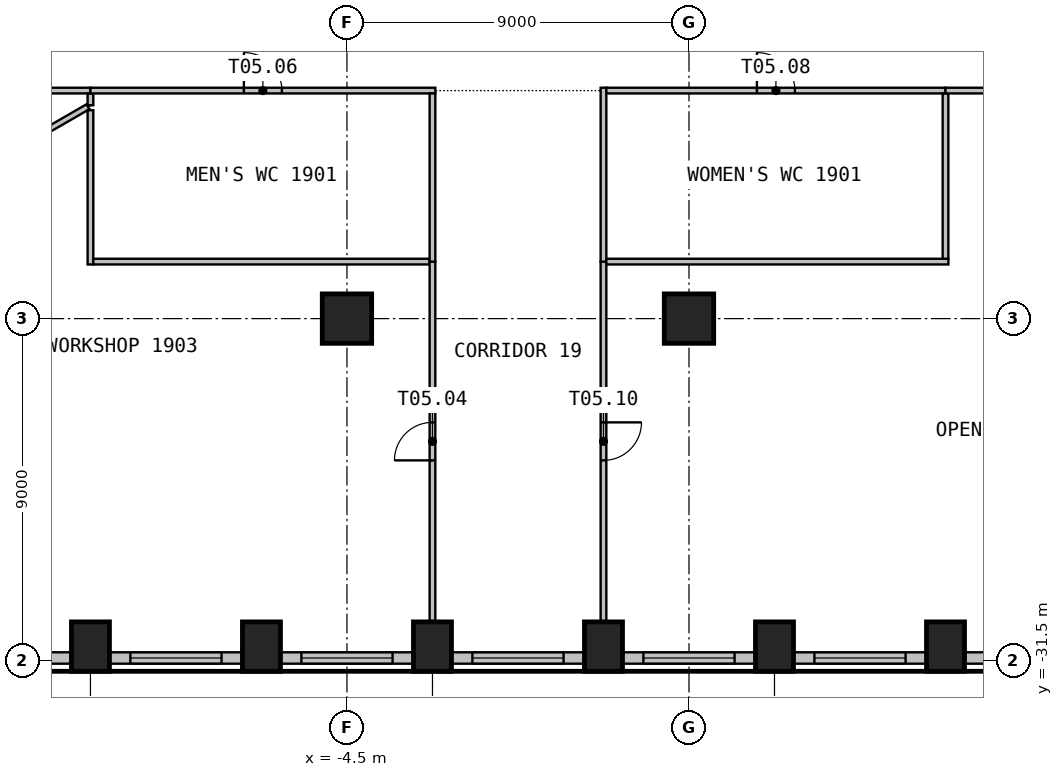
"""IFC4 building model, lengths in metres.
Left out: names, types, materials, properties, quantities, classifications, styles, units other than length and angle.
Written with IfcOpenShell. Run it as: python <this file> out.ifc"""

import sys

from ifc_helpers import new_model, si_unit, direction, frame, frame_2d, origin, origin_2d, place, context, subcontext, project, spatial, rectangle, circle, extrude, element, fill, save


model = new_model("IFC4")
c1 = context("Model", 3, precision=1e-05, world=origin(), true_north=direction((0.0, 1.0)))
c2 = subcontext(c1, "Body", "Model", "MODEL_VIEW")
j1 = project(units=[si_unit("LENGTHUNIT", "METRE"), si_unit("PLANEANGLEUNIT", "RADIAN")], contexts=[c1])
p1 = place(None, origin())
s1 = spatial("IfcSite", under=j1, at=p1, CompositionType="ELEMENT")
p2 = place(p1, origin())
s2 = spatial("IfcBuilding", under=s1, at=p2, CompositionType="ELEMENT")
p3 = place(p2, frame((0.0, 0.0, 81.3)))
s3 = spatial("IfcBuildingStorey", under=s2, at=p3, CompositionType="ELEMENT", Elevation=81.3)
for number, where, z_axis, x_axis in (
    (1, (-11.25, -31.13, 0.0), (0.0, 0.0, 1.0), (1.0, 0.0, 0.0)),
    (2, (-6.75, -31.13, 0.0), (0.0, 0.0, 1.0), (1.0, 0.0, 0.0)),
    (3, (-2.25, -31.13, 0.0), (0.0, 0.0, 1.0), (1.0, 0.0, 0.0)),
    (4, (2.25, -31.13, 0.0), (0.0, 0.0, 1.0), (1.0, 0.0, 0.0)),
    (5, (6.75, -31.13, 0.0), (0.0, 0.0, 1.0), (1.0, 0.0, 0.0)),
    (6, (11.25, -31.13, 0.0), (0.0, 0.0, 1.0), (1.0, 0.0, 0.0)),
):
    element("IfcColumn", number, at=place(p3, frame(where, z_axis=z_axis, x_axis=x_axis)), inside=s3, PredefinedType="COLUMN", context=c2, shape_type="SweptSolid", body=[
        extrude(rectangle(XDim=1.0, YDim=1.3, at=origin_2d()), origin(), (0.0, 0.0, 1.0), 3.525),
    ])
for number, where, z_axis, x_axis in (
    (7, (-4.5, -22.5, 0.0), (0.0, 0.0, 1.0), (1.0, 0.0, 0.0)),
    (8, (4.5, -22.5, 0.0), (0.0, 0.0, 1.0), (1.0, 0.0, 0.0)),
):
    element("IfcColumn", number, at=place(p3, frame(where, z_axis=z_axis, x_axis=x_axis)), inside=s3, PredefinedType="COLUMN", context=c2, shape_type="SweptSolid", body=[
        extrude(circle(Radius=0.65, at=origin_2d()), origin(), (0.0, 0.0, 1.0), 3.525),
    ])
p4 = place(p3, frame((-15.25, -31.43, 0.0), z_axis=(0.0, 0.0, 1.0), x_axis=(1.0, 0.0, 0.0)))
e9 = element("IfcWall", 9, at=p4, inside=s3, PredefinedType="SOLIDWALL", context=c2, shape_type="SweptSolid", body=[
    extrude(rectangle(XDim=3.499, YDim=0.3, at=frame_2d((1.75, 0.0))), origin(), (0.0, 0.0, 1.0), 3.525),
])
p5 = place(p4, frame((0.55, 0.0, 0.9)))
e10 = element("IfcOpeningElement", 10, at=p5, cuts=e9, PredefinedType="OPENING", context=c2, shape_type="SweptSolid", body=[
    extrude(rectangle(XDim=2.4, YDim=2.1, at=frame_2d((1.2, 1.05))), frame((0.0, 0.16, 0.0), z_axis=(0.0, -1.0, 0.0), x_axis=(1.0, 0.0, 0.0)), (0.0, 0.0, 1.0), 0.32),
])
p6 = place(p3, frame((-10.75, -31.43, 0.0), z_axis=(0.0, 0.0, 1.0), x_axis=(1.0, 0.0, 0.0)))
e11 = element("IfcWall", 11, at=p6, inside=s3, PredefinedType="SOLIDWALL", context=c2, shape_type="SweptSolid", body=[
    extrude(rectangle(XDim=3.499, YDim=0.3, at=frame_2d((1.75, 0.0))), origin(), (0.0, 0.0, 1.0), 3.525),
])
p7 = place(p6, frame((0.55, 0.0, 0.9)))
e12 = element("IfcOpeningElement", 12, at=p7, cuts=e11, PredefinedType="OPENING", context=c2, shape_type="SweptSolid", body=[
    extrude(rectangle(XDim=2.4, YDim=2.1, at=frame_2d((1.2, 1.05))), frame((0.0, 0.16, 0.0), z_axis=(0.0, -1.0, 0.0), x_axis=(1.0, 0.0, 0.0)), (0.0, 0.0, 1.0), 0.32),
])
p8 = place(p3, frame((-6.25, -31.43, 0.0), z_axis=(0.0, 0.0, 1.0), x_axis=(1.0, 0.0, 0.0)))
e13 = element("IfcWall", 13, at=p8, inside=s3, PredefinedType="SOLIDWALL", context=c2, shape_type="SweptSolid", body=[
    extrude(rectangle(XDim=3.499, YDim=0.3, at=frame_2d((1.75, 0.0))), origin(), (0.0, 0.0, 1.0), 3.525),
])
p9 = place(p8, frame((0.55, 0.0, 0.9)))
e14 = element("IfcOpeningElement", 14, at=p9, cuts=e13, PredefinedType="OPENING", context=c2, shape_type="SweptSolid", body=[
    extrude(rectangle(XDim=2.4, YDim=2.1, at=frame_2d((1.2, 1.05))), frame((0.0, 0.16, 0.0), z_axis=(0.0, -1.0, 0.0), x_axis=(1.0, 0.0, 0.0)), (0.0, 0.0, 1.0), 0.32),
])
p10 = place(p3, frame((-1.75, -31.43, 0.0), z_axis=(0.0, 0.0, 1.0), x_axis=(1.0, 0.0, 0.0)))
e15 = element("IfcWall", 15, at=p10, inside=s3, PredefinedType="SOLIDWALL", context=c2, shape_type="SweptSolid", body=[
    extrude(rectangle(XDim=3.499, YDim=0.3, at=frame_2d((1.75, 0.0))), origin(), (0.0, 0.0, 1.0), 3.525),
])
p11 = place(p10, frame((0.55, 0.0, 0.9)))
e16 = element("IfcOpeningElement", 16, at=p11, cuts=e15, PredefinedType="OPENING", context=c2, shape_type="SweptSolid", body=[
    extrude(rectangle(XDim=2.4, YDim=2.1, at=frame_2d((1.2, 1.05))), frame((0.0, 0.16, 0.0), z_axis=(0.0, -1.0, 0.0), x_axis=(1.0, 0.0, 0.0)), (0.0, 0.0, 1.0), 0.32),
])
p12 = place(p3, frame((2.75, -31.43, 0.0), z_axis=(0.0, 0.0, 1.0), x_axis=(1.0, 0.0, 0.0)))
e17 = element("IfcWall", 17, at=p12, inside=s3, PredefinedType="SOLIDWALL", context=c2, shape_type="SweptSolid", body=[
    extrude(rectangle(XDim=3.499, YDim=0.3, at=frame_2d((1.75, 0.0))), origin(), (0.0, 0.0, 1.0), 3.525),
])
p13 = place(p12, frame((0.55, 0.0, 0.9)))
e18 = element("IfcOpeningElement", 18, at=p13, cuts=e17, PredefinedType="OPENING", context=c2, shape_type="SweptSolid", body=[
    extrude(rectangle(XDim=2.4, YDim=2.1, at=frame_2d((1.2, 1.05))), frame((0.0, 0.16, 0.0), z_axis=(0.0, -1.0, 0.0), x_axis=(1.0, 0.0, 0.0)), (0.0, 0.0, 1.0), 0.32),
])
p14 = place(p3, frame((7.25, -31.43, 0.0), z_axis=(0.0, 0.0, 1.0), x_axis=(1.0, 0.0, 0.0)))
e19 = element("IfcWall", 19, at=p14, inside=s3, PredefinedType="SOLIDWALL", context=c2, shape_type="SweptSolid", body=[
    extrude(rectangle(XDim=3.499, YDim=0.3, at=frame_2d((1.75, 0.0))), origin(), (0.0, 0.0, 1.0), 3.525),
])
p15 = place(p14, frame((0.55, 0.0, 0.9)))
e20 = element("IfcOpeningElement", 20, at=p15, cuts=e19, PredefinedType="OPENING", context=c2, shape_type="SweptSolid", body=[
    extrude(rectangle(XDim=2.4, YDim=2.1, at=frame_2d((1.2, 1.05))), frame((0.0, 0.16, 0.0), z_axis=(0.0, -1.0, 0.0), x_axis=(1.0, 0.0, 0.0)), (0.0, 0.0, 1.0), 0.32),
])
p16 = place(p3, frame((11.75, -31.43, 0.0), z_axis=(0.0, 0.0, 1.0), x_axis=(1.0, 0.0, 0.0)))
e21 = element("IfcWall", 21, at=p16, inside=s3, PredefinedType="SOLIDWALL", context=c2, shape_type="SweptSolid", body=[
    extrude(rectangle(XDim=3.499, YDim=0.3, at=frame_2d((1.75, 0.0))), origin(), (0.0, 0.0, 1.0), 3.525),
])
p17 = place(p16, frame((0.55, 0.0, 0.9)))
e22 = element("IfcOpeningElement", 22, at=p17, cuts=e21, PredefinedType="OPENING", context=c2, shape_type="SweptSolid", body=[
    extrude(rectangle(XDim=2.4, YDim=2.1, at=frame_2d((1.2, 1.05))), frame((0.0, 0.16, 0.0), z_axis=(0.0, -1.0, 0.0), x_axis=(1.0, 0.0, 0.0)), (0.0, 0.0, 1.0), 0.32),
])
p18 = place(p3, frame((-11.315, -16.925, 0.0), z_axis=(0.0, 0.0, 1.0), x_axis=(-0.86600725109, -0.500031440071, 0.0)))
e23 = element("IfcWall", 23, at=p18, inside=s3, PredefinedType="PARTITIONING", context=c2, shape_type="SweptSolid", body=[
    extrude(rectangle(XDim=16.096, YDim=0.15, at=frame_2d((8.048, 0.0))), origin(), (0.0, 0.0, 1.0), 3.525),
])
p19 = place(p3, frame((-20.925, -16.5, 0.0), z_axis=(0.0, 0.0, 1.0), x_axis=(1.0, 0.0, 0.0)))
e24 = element("IfcWall", 24, at=p19, inside=s3, PredefinedType="PARTITIONING", context=c2, shape_type="SweptSolid", body=[
    extrude(rectangle(XDim=9.675, YDim=0.15, at=frame_2d((4.837, 0.0))), origin(), (0.0, 0.0, 1.0), 3.525),
])
p20 = place(p19, frame((4.337, 0.0, 0.0)))
e25 = element("IfcOpeningElement", 25, at=p20, cuts=e24, PredefinedType="OPENING", context=c2, shape_type="SweptSolid", body=[
    extrude(rectangle(XDim=1.0, YDim=2.1, at=frame_2d((0.5, 1.05))), frame((0.0, 0.085, 0.0), z_axis=(0.0, -1.0, 0.0), x_axis=(1.0, 0.0, 0.0)), (0.0, 0.0, 1.0), 0.17),
])
p21 = place(p3, frame((-11.25, -17.017, 0.0), z_axis=(0.0, 0.0, 1.0), x_axis=(0.0, -1.0, 0.0)))
e26 = element("IfcWall", 26, at=p21, inside=s3, PredefinedType="PARTITIONING", context=c2, shape_type="SweptSolid", body=[
    extrude(rectangle(XDim=4.058, YDim=0.15, at=frame_2d((2.029, 0.0))), origin(), (0.0, 0.0, 1.0), 3.525),
])
p22 = place(p3, frame((-11.175, -21.0, 0.0), z_axis=(0.0, 0.0, 1.0), x_axis=(1.0, 0.0, 0.0)))
e27 = element("IfcWall", 27, at=p22, inside=s3, PredefinedType="PARTITIONING", context=c2, shape_type="SweptSolid", body=[
    extrude(rectangle(XDim=8.85, YDim=0.15, at=frame_2d((4.425, 0.0))), origin(), (0.0, 0.0, 1.0), 3.525),
])
p23 = place(p3, frame((-11.25, -16.575, 0.0), z_axis=(0.0, 0.0, 1.0), x_axis=(0.0, -1.0, 0.0)))
e28 = element("IfcWall", 28, at=p23, inside=s3, PredefinedType="PARTITIONING", context=c2, shape_type="SweptSolid", body=[
    extrude(rectangle(XDim=0.312, YDim=0.15, at=frame_2d((0.156, 0.0))), origin(), (0.0, 0.0, 1.0), 3.525),
])
p24 = place(p3, frame((-11.25, -16.5, 0.0), z_axis=(0.0, 0.0, 1.0), x_axis=(1.0, 0.0, 0.0)))
e29 = element("IfcWall", 29, at=p24, inside=s3, PredefinedType="PARTITIONING", context=c2, shape_type="SweptSolid", body=[
    extrude(rectangle(XDim=9.075, YDim=0.15, at=frame_2d((4.538, 0.0))), origin(), (0.0, 0.0, 1.0), 3.525),
])
p25 = place(p24, frame((4.038, 0.0, 0.0)))
e30 = element("IfcOpeningElement", 30, at=p25, cuts=e29, PredefinedType="OPENING", context=c2, shape_type="SweptSolid", body=[
    extrude(rectangle(XDim=1.0, YDim=2.1, at=frame_2d((0.5, 1.05))), frame((0.0, 0.085, 0.0), z_axis=(0.0, -1.0, 0.0), x_axis=(1.0, 0.0, 0.0)), (0.0, 0.0, 1.0), 0.17),
])
p26 = place(p3, frame((-2.25, -30.46, 0.0), z_axis=(0.0, 0.0, 1.0), x_axis=(0.0, 1.0, 0.0)))
e31 = element("IfcWall", 31, at=p26, inside=s3, PredefinedType="PARTITIONING", context=c2, shape_type="SweptSolid", body=[
    extrude(rectangle(XDim=9.46, YDim=0.15, at=frame_2d((4.73, 0.0))), origin(), (0.0, 0.0, 1.0), 3.525),
])
p27 = place(p26, frame((4.23, 0.0, 0.0)))
e32 = element("IfcOpeningElement", 32, at=p27, cuts=e31, PredefinedType="OPENING", context=c2, shape_type="SweptSolid", body=[
    extrude(rectangle(XDim=1.0, YDim=2.1, at=frame_2d((0.5, 1.05))), frame((0.0, 0.085, 0.0), z_axis=(0.0, -1.0, 0.0), x_axis=(1.0, 0.0, 0.0)), (0.0, 0.0, 1.0), 0.17),
])
p28 = place(p3, frame((-2.25, -21.0, 0.0), z_axis=(0.0, 0.0, 1.0), x_axis=(0.0, 1.0, 0.0)))
e33 = element("IfcWall", 33, at=p28, inside=s3, PredefinedType="PARTITIONING", context=c2, shape_type="SweptSolid", body=[
    extrude(rectangle(XDim=4.425, YDim=0.15, at=frame_2d((2.212, 0.0))), origin(), (0.0, 0.0, 1.0), 3.525),
])
p29 = place(p3, frame((2.25, -21.0, 0.0), z_axis=(0.0, 0.0, 1.0), x_axis=(0.0, -1.0, 0.0)))
e34 = element("IfcWall", 34, at=p29, inside=s3, PredefinedType="PARTITIONING", context=c2, shape_type="SweptSolid", body=[
    extrude(rectangle(XDim=9.46, YDim=0.15, at=frame_2d((4.73, 0.0))), origin(), (0.0, 0.0, 1.0), 3.525),
])
p30 = place(p29, frame((4.23, 0.0, 0.0)))
e35 = element("IfcOpeningElement", 35, at=p30, cuts=e34, PredefinedType="OPENING", context=c2, shape_type="SweptSolid", body=[
    extrude(rectangle(XDim=1.0, YDim=2.1, at=frame_2d((0.5, 1.05))), frame((0.0, 0.085, 0.0), z_axis=(0.0, -1.0, 0.0), x_axis=(1.0, 0.0, 0.0)), (0.0, 0.0, 1.0), 0.17),
])
p31 = place(p3, frame((2.25, -16.425, 0.0), z_axis=(0.0, 0.0, 1.0), x_axis=(0.0, -1.0, 0.0)))
e36 = element("IfcWall", 36, at=p31, inside=s3, PredefinedType="PARTITIONING", context=c2, shape_type="SweptSolid", body=[
    extrude(rectangle(XDim=4.575, YDim=0.15, at=frame_2d((2.288, 0.0))), origin(), (0.0, 0.0, 1.0), 3.525),
])
p32 = place(p3, frame((11.325, -21.0, 0.0), z_axis=(0.0, 0.0, 1.0), x_axis=(-1.0, 0.0, 0.0)))
e37 = element("IfcWall", 37, at=p32, inside=s3, PredefinedType="PARTITIONING", context=c2, shape_type="SweptSolid", body=[
    extrude(rectangle(XDim=9.0, YDim=0.15, at=frame_2d((4.5, 0.0))), origin(), (0.0, 0.0, 1.0), 3.525),
])
p33 = place(p3, frame((2.325, -16.5, 0.0), z_axis=(0.0, 0.0, 1.0), x_axis=(1.0, 0.0, 0.0)))
e38 = element("IfcWall", 38, at=p33, inside=s3, PredefinedType="PARTITIONING", context=c2, shape_type="SweptSolid", body=[
    extrude(rectangle(XDim=8.925, YDim=0.15, at=frame_2d((4.462, 0.0))), origin(), (0.0, 0.0, 1.0), 3.525),
])
p34 = place(p33, frame((3.962, 0.0, 0.0)))
e39 = element("IfcOpeningElement", 39, at=p34, cuts=e38, PredefinedType="OPENING", context=c2, shape_type="SweptSolid", body=[
    extrude(rectangle(XDim=1.0, YDim=2.1, at=frame_2d((0.5, 1.05))), frame((0.0, 0.085, 0.0), z_axis=(0.0, -1.0, 0.0), x_axis=(1.0, 0.0, 0.0)), (0.0, 0.0, 1.0), 0.17),
])
p35 = place(p3, frame((11.25, -16.575, 0.0), z_axis=(0.0, 0.0, 1.0), x_axis=(0.0, -1.0, 0.0)))
e40 = element("IfcWall", 40, at=p35, inside=s3, PredefinedType="PARTITIONING", context=c2, shape_type="SweptSolid", body=[
    extrude(rectangle(XDim=4.35, YDim=0.15, at=frame_2d((2.175, 0.0))), origin(), (0.0, 0.0, 1.0), 3.525),
])
p36 = place(p3, frame((11.25, -16.5, 0.0), z_axis=(0.0, 0.0, 1.0), x_axis=(1.0, 0.0, 0.0)))
e41 = element("IfcWall", 41, at=p36, inside=s3, PredefinedType="PARTITIONING", context=c2, shape_type="SweptSolid", body=[
    extrude(rectangle(XDim=8.329, YDim=0.15, at=frame_2d((4.165, 0.0))), origin(), (0.0, 0.0, 1.0), 3.525),
])
p37 = place(p7, origin())
e42 = element("IfcWindow", 42, at=p37, inside=s3, PartitioningType="SINGLE_PANEL", PredefinedType="WINDOW", context=c2, shape_type="SweptSolid", body=[
    extrude(rectangle(XDim=2.4, YDim=2.1, at=frame_2d((1.2, 1.05))), frame((0.0, 0.03, 0.0), z_axis=(0.0, -1.0, 0.0), x_axis=(1.0, 0.0, 0.0)), (0.0, 0.0, 1.0), 0.06),
])
fill(e12, e42)
p38 = place(p9, origin())
e43 = element("IfcWindow", 43, at=p38, inside=s3, PartitioningType="SINGLE_PANEL", PredefinedType="WINDOW", context=c2, shape_type="SweptSolid", body=[
    extrude(rectangle(XDim=2.4, YDim=2.1, at=frame_2d((1.2, 1.05))), frame((0.0, 0.03, 0.0), z_axis=(0.0, -1.0, 0.0), x_axis=(1.0, 0.0, 0.0)), (0.0, 0.0, 1.0), 0.06),
])
fill(e14, e43)
p39 = place(p11, origin())
e44 = element("IfcWindow", 44, at=p39, inside=s3, PartitioningType="SINGLE_PANEL", PredefinedType="WINDOW", context=c2, shape_type="SweptSolid", body=[
    extrude(rectangle(XDim=2.4, YDim=2.1, at=frame_2d((1.2, 1.05))), frame((0.0, 0.03, 0.0), z_axis=(0.0, -1.0, 0.0), x_axis=(1.0, 0.0, 0.0)), (0.0, 0.0, 1.0), 0.06),
])
fill(e16, e44)
p40 = place(p13, origin())
e45 = element("IfcWindow", 45, at=p40, inside=s3, PartitioningType="SINGLE_PANEL", PredefinedType="WINDOW", context=c2, shape_type="SweptSolid", body=[
    extrude(rectangle(XDim=2.4, YDim=2.1, at=frame_2d((1.2, 1.05))), frame((0.0, 0.03, 0.0), z_axis=(0.0, -1.0, 0.0), x_axis=(1.0, 0.0, 0.0)), (0.0, 0.0, 1.0), 0.06),
])
fill(e18, e45)
p41 = place(p15, origin())
e46 = element("IfcWindow", 46, at=p41, inside=s3, PartitioningType="SINGLE_PANEL", PredefinedType="WINDOW", context=c2, shape_type="SweptSolid", body=[
    extrude(rectangle(XDim=2.4, YDim=2.1, at=frame_2d((1.2, 1.05))), frame((0.0, 0.03, 0.0), z_axis=(0.0, -1.0, 0.0), x_axis=(1.0, 0.0, 0.0)), (0.0, 0.0, 1.0), 0.06),
])
fill(e20, e46)
p42 = place(p27, origin())
e47 = element("IfcDoor", 47, at=p42, inside=s3, OperationType="SINGLE_SWING_RIGHT", PredefinedType="DOOR", context=c2, shape_type="SweptSolid", body=[
    extrude(rectangle(XDim=1.0, YDim=2.1, at=frame_2d((0.5, 1.05))), frame((0.0, 0.025, 0.0), z_axis=(0.0, -1.0, 0.0), x_axis=(1.0, 0.0, 0.0)), (0.0, 0.0, 1.0), 0.05),
])
fill(e32, e47)
p43 = place(p25, origin())
e48 = element("IfcDoor", 48, at=p43, inside=s3, OperationType="SINGLE_SWING_RIGHT", PredefinedType="DOOR", context=c2, shape_type="SweptSolid", body=[
    extrude(rectangle(XDim=1.0, YDim=2.1, at=frame_2d((0.5, 1.05))), frame((0.0, 0.025, 0.0), z_axis=(0.0, -1.0, 0.0), x_axis=(1.0, 0.0, 0.0)), (0.0, 0.0, 1.0), 0.05),
])
fill(e30, e48)
p44 = place(p34, origin())
e49 = element("IfcDoor", 49, at=p44, inside=s3, OperationType="SINGLE_SWING_LEFT", PredefinedType="DOOR", context=c2, shape_type="SweptSolid", body=[
    extrude(rectangle(XDim=1.0, YDim=2.1, at=frame_2d((0.5, 1.05))), frame((0.0, 0.025, 0.0), z_axis=(0.0, -1.0, 0.0), x_axis=(1.0, 0.0, 0.0)), (0.0, 0.0, 1.0), 0.05),
])
fill(e39, e49)
p45 = place(p30, origin())
e50 = element("IfcDoor", 50, at=p45, inside=s3, OperationType="SINGLE_SWING_LEFT", PredefinedType="DOOR", context=c2, shape_type="SweptSolid", body=[
    extrude(rectangle(XDim=1.0, YDim=2.1, at=frame_2d((0.5, 1.05))), frame((0.0, 0.025, 0.0), z_axis=(0.0, -1.0, 0.0), x_axis=(1.0, 0.0, 0.0)), (0.0, 0.0, 1.0), 0.05),
])
fill(e35, e50)
save(model, sys.argv[1])
